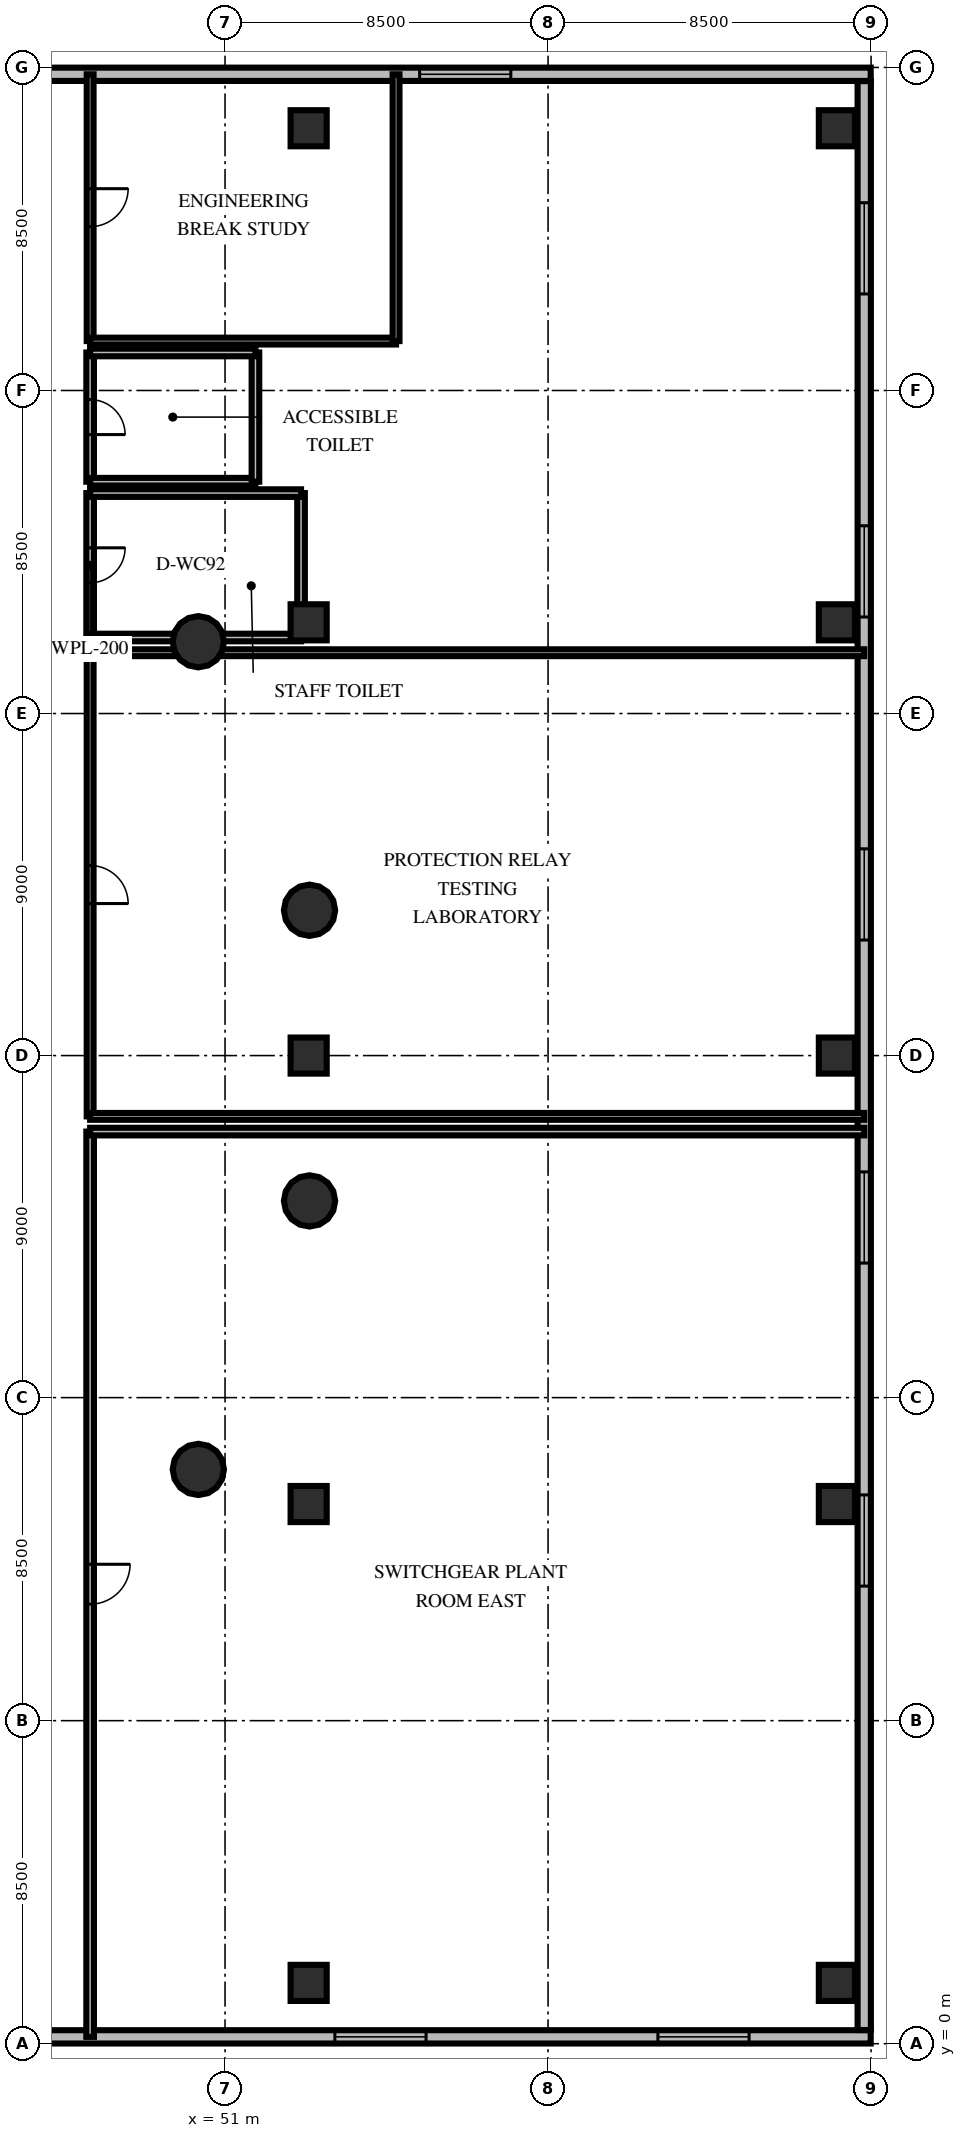
"""IFC4 building model, lengths in metres.
Left out: names, types, materials, properties, quantities, classifications, styles, units other than length and angle.
Written with IfcOpenShell. Run it as: python <this file> out.ifc"""

import sys

from ifc_helpers import new_model, si_unit, direction, frame, frame_2d, origin, origin_2d, place, context, subcontext, project, spatial, rectangle, circle, extrude, element, fill, save


model = new_model("IFC4")
c1 = context("Model", 3, precision=1e-05, world=origin(), true_north=direction((0.0, 1.0)))
c2 = subcontext(c1, "Body", "Model", "MODEL_VIEW")
j1 = project(units=[si_unit("LENGTHUNIT", "METRE"), si_unit("PLANEANGLEUNIT", "RADIAN")], contexts=[c1])
p1 = place(None, origin())
s1 = spatial("IfcSite", under=j1, at=p1, CompositionType="ELEMENT")
p2 = place(p1, origin())
s2 = spatial("IfcBuilding", under=s1, at=p2, CompositionType="ELEMENT")
p3 = place(p2, frame((0.0, 0.0, 15.6)))
s3 = spatial("IfcBuildingStorey", under=s2, at=p3, CompositionType="ELEMENT", Elevation=15.6)
for number, where, z_axis, x_axis in (
    (1, (53.2, 1.6, 0.0), (0.0, 0.0, 1.0), (1.0, 0.0, 0.0)),
    (2, (53.2, 14.2, 0.0), (0.0, 0.0, 1.0), (1.0, 0.0, 0.0)),
    (3, (53.2, 26.0, 0.0), (0.0, 0.0, 1.0), (1.0, 0.0, 0.0)),
    (4, (53.2, 37.4, 0.0), (0.0, 0.0, 1.0), (1.0, 0.0, 0.0)),
    (5, (53.2, 50.4, 0.0), (0.0, 0.0, 1.0), (1.0, 0.0, 0.0)),
    (6, (67.1, 1.6, 0.0), (0.0, 0.0, 1.0), (1.0, 0.0, 0.0)),
    (7, (67.1, 14.2, 0.0), (0.0, 0.0, 1.0), (1.0, 0.0, 0.0)),
    (8, (67.1, 26.0, 0.0), (0.0, 0.0, 1.0), (1.0, 0.0, 0.0)),
    (9, (67.1, 37.4, 0.0), (0.0, 0.0, 1.0), (1.0, 0.0, 0.0)),
    (10, (67.1, 50.4, 0.0), (0.0, 0.0, 1.0), (1.0, 0.0, 0.0)),
):
    element("IfcColumn", number, at=place(p3, frame(where, z_axis=z_axis, x_axis=x_axis)), inside=s3, PredefinedType="COLUMN", context=c2, shape_type="SweptSolid", body=[
        extrude(rectangle(XDim=0.95, YDim=0.95, at=origin_2d()), origin(), (0.0, 0.0, 1.0), 4.8),
    ])
for number, where, z_axis, x_axis in (
    (11, (53.223, 29.824, 0.0), (0.0, 0.0, 1.0), (1.0, 0.0, 0.0)),
    (12, (50.297, 36.889, 0.0), (0.0, 0.0, 1.0), (1.0, 0.0, 0.0)),
    (13, (50.297, 15.111, 0.0), (0.0, 0.0, 1.0), (1.0, 0.0, 0.0)),
    (14, (53.223, 22.176, 0.0), (0.0, 0.0, 1.0), (1.0, 0.0, 0.0)),
):
    element("IfcColumn", number, at=place(p3, frame(where, z_axis=z_axis, x_axis=x_axis)), inside=s3, PredefinedType="COLUMN", context=c2, shape_type="SweptSolid", body=[
        extrude(circle(Radius=0.675, at=origin_2d()), origin(), (0.0, 0.0, 1.0), 4.8),
    ])
p4 = place(p3, frame((67.99, 0.18, 0.0), z_axis=(0.0, 0.0, 1.0), x_axis=(-1.0, 0.0, 0.0)))
e15 = element("IfcWall", 15, at=p4, inside=s3, PredefinedType="SOLIDWALL", context=c2, shape_type="SweptSolid", body=[
    extrude(rectangle(XDim=25.42, YDim=0.35, at=frame_2d((12.71, 0.0))), origin(), (0.0, 0.0, 1.0), 3.76),
])
p5 = place(p4, frame((3.2, 0.0, 0.85)))
e16 = element("IfcOpeningElement", 16, at=p5, cuts=e15, PredefinedType="OPENING", context=c2, shape_type="SweptSolid", body=[
    extrude(rectangle(XDim=2.4, YDim=2.4, at=frame_2d((1.2, 1.2))), frame((0.0, 0.185, 0.0), z_axis=(0.0, -1.0, 0.0), x_axis=(1.0, 0.0, 0.0)), (0.0, 0.0, 1.0), 0.37),
])
p6 = place(p4, frame((11.7, 0.0, 0.85)))
e17 = element("IfcOpeningElement", 17, at=p6, cuts=e15, PredefinedType="OPENING", context=c2, shape_type="SweptSolid", body=[
    extrude(rectangle(XDim=2.4, YDim=2.4, at=frame_2d((1.2, 1.2))), frame((0.0, 0.185, 0.0), z_axis=(0.0, -1.0, 0.0), x_axis=(1.0, 0.0, 0.0)), (0.0, 0.0, 1.0), 0.37),
])
p7 = place(p3, frame((67.82, 51.64, 0.0), z_axis=(0.0, 0.0, 1.0), x_axis=(0.0, -1.0, 0.0)))
e18 = element("IfcWall", 18, at=p7, inside=s3, PredefinedType="SOLIDWALL", context=c2, shape_type="SweptSolid", body=[
    extrude(rectangle(XDim=51.28, YDim=0.35, at=frame_2d((25.64, 0.0))), origin(), (0.0, 0.0, 1.0), 3.76),
])
p8 = place(p7, frame((3.2, 0.0, 0.85)))
e19 = element("IfcOpeningElement", 19, at=p8, cuts=e18, PredefinedType="OPENING", context=c2, shape_type="SweptSolid", body=[
    extrude(rectangle(XDim=2.4, YDim=2.4, at=frame_2d((1.2, 1.2))), frame((0.0, 0.185, 0.0), z_axis=(0.0, -1.0, 0.0), x_axis=(1.0, 0.0, 0.0)), (0.0, 0.0, 1.0), 0.37),
])
p9 = place(p7, frame((11.7, 0.0, 0.85)))
e20 = element("IfcOpeningElement", 20, at=p9, cuts=e18, PredefinedType="OPENING", context=c2, shape_type="SweptSolid", body=[
    extrude(rectangle(XDim=2.4, YDim=2.4, at=frame_2d((1.2, 1.2))), frame((0.0, 0.185, 0.0), z_axis=(0.0, -1.0, 0.0), x_axis=(1.0, 0.0, 0.0)), (0.0, 0.0, 1.0), 0.37),
])
p10 = place(p7, frame((20.2, 0.0, 0.85)))
e21 = element("IfcOpeningElement", 21, at=p10, cuts=e18, PredefinedType="OPENING", context=c2, shape_type="SweptSolid", body=[
    extrude(rectangle(XDim=2.4, YDim=2.4, at=frame_2d((1.2, 1.2))), frame((0.0, 0.185, 0.0), z_axis=(0.0, -1.0, 0.0), x_axis=(1.0, 0.0, 0.0)), (0.0, 0.0, 1.0), 0.37),
])
p11 = place(p7, frame((28.7, 0.0, 0.85)))
e22 = element("IfcOpeningElement", 22, at=p11, cuts=e18, PredefinedType="OPENING", context=c2, shape_type="SweptSolid", body=[
    extrude(rectangle(XDim=2.4, YDim=2.4, at=frame_2d((1.2, 1.2))), frame((0.0, 0.185, 0.0), z_axis=(0.0, -1.0, 0.0), x_axis=(1.0, 0.0, 0.0)), (0.0, 0.0, 1.0), 0.37),
])
p12 = place(p7, frame((37.2, 0.0, 0.85)))
e23 = element("IfcOpeningElement", 23, at=p12, cuts=e18, PredefinedType="OPENING", context=c2, shape_type="SweptSolid", body=[
    extrude(rectangle(XDim=2.4, YDim=2.4, at=frame_2d((1.2, 1.2))), frame((0.0, 0.185, 0.0), z_axis=(0.0, -1.0, 0.0), x_axis=(1.0, 0.0, 0.0)), (0.0, 0.0, 1.0), 0.37),
])
p13 = place(p3, frame((42.57, 51.82, 0.0), z_axis=(0.0, 0.0, 1.0), x_axis=(1.0, 0.0, 0.0)))
e24 = element("IfcWall", 24, at=p13, inside=s3, PredefinedType="SOLIDWALL", context=c2, shape_type="SweptSolid", body=[
    extrude(rectangle(XDim=25.42, YDim=0.35, at=frame_2d((12.71, 0.0))), origin(), (0.0, 0.0, 1.0), 3.76),
])
p14 = place(p13, frame((13.55, 0.0, 0.85)))
e25 = element("IfcOpeningElement", 25, at=p14, cuts=e24, PredefinedType="OPENING", context=c2, shape_type="SweptSolid", body=[
    extrude(rectangle(XDim=2.4, YDim=2.4, at=frame_2d((1.2, 1.2))), frame((0.0, 0.185, 0.0), z_axis=(0.0, -1.0, 0.0), x_axis=(1.0, 0.0, 0.0)), (0.0, 0.0, 1.0), 0.37),
])
p15 = place(p3, frame((47.45, 24.0, 0.0), z_axis=(0.0, 0.0, 1.0), x_axis=(0.0, -1.0, 0.0)))
e26 = element("IfcWall", 26, at=p15, inside=s3, PredefinedType="SOLIDWALL", context=c2, shape_type="SweptSolid", body=[
    extrude(rectangle(XDim=23.82, YDim=0.2, at=frame_2d((11.91, 0.0))), origin(), (0.0, 0.0, 1.0), 2.61),
])
p16 = place(p15, frame((11.385, 0.0, 0.0)))
e27 = element("IfcOpeningElement", 27, at=p16, cuts=e26, PredefinedType="OPENING", context=c2, shape_type="SweptSolid", body=[
    extrude(rectangle(XDim=1.05, YDim=2.15, at=frame_2d((0.525, 1.075))), frame((0.0, 0.11, 0.0), z_axis=(0.0, -1.0, 0.0), x_axis=(1.0, 0.0, 0.0)), (0.0, 0.0, 1.0), 0.22),
])
p17 = place(p3, frame((67.82, 24.0, 0.0), z_axis=(0.0, 0.0, 1.0), x_axis=(-1.0, 0.0, 0.0)))
e28 = element("IfcWall", 28, at=p17, inside=s3, PredefinedType="SOLIDWALL", context=c2, shape_type="SweptSolid", body=[
    extrude(rectangle(XDim=20.37, YDim=0.2, at=frame_2d((10.185, 0.0))), origin(), (0.0, 0.0, 1.0), 2.61),
])
p18 = place(p3, frame((47.45, 36.6, 0.0), z_axis=(0.0, 0.0, 1.0), x_axis=(0.0, -1.0, 0.0)))
e29 = element("IfcWall", 29, at=p18, inside=s3, PredefinedType="PARTITIONING", context=c2, shape_type="SweptSolid", body=[
    extrude(rectangle(XDim=12.2, YDim=0.18, at=frame_2d((6.1, 0.0))), origin(), (0.0, 0.0, 1.0), 2.61),
])
p19 = place(p18, frame((5.6, 0.0, 0.0)))
e30 = element("IfcOpeningElement", 30, at=p19, cuts=e29, PredefinedType="OPENING", context=c2, shape_type="SweptSolid", body=[
    extrude(rectangle(XDim=1.0, YDim=2.15, at=frame_2d((0.5, 1.075))), frame((0.0, 0.1, 0.0), z_axis=(0.0, -1.0, 0.0), x_axis=(1.0, 0.0, 0.0)), (0.0, 0.0, 1.0), 0.2),
])
for number, where, z_axis, x_axis in (
    (31, (47.45, 24.4, 0.0), (0.0, 0.0, 1.0), (1.0, 0.0, 0.0)),
    (32, (67.82, 36.6, 0.0), (0.0, 0.0, 1.0), (-1.0, 0.0, 0.0)),
):
    element("IfcWall", number, at=place(p3, frame(where, z_axis=z_axis, x_axis=x_axis)), inside=s3, PredefinedType="PARTITIONING", context=c2, shape_type="SweptSolid", body=[
        extrude(rectangle(XDim=20.37, YDim=0.18, at=frame_2d((10.185, 0.0))), origin(), (0.0, 0.0, 1.0), 2.61),
    ])
p20 = place(p3, frame((47.45, 40.8, 0.0), z_axis=(0.0, 0.0, 1.0), x_axis=(0.0, -1.0, 0.0)))
e33 = element("IfcWall", 33, at=p20, inside=s3, PredefinedType="PLUMBINGWALL", context=c2, shape_type="SweptSolid", body=[
    extrude(rectangle(XDim=3.8, YDim=0.2, at=frame_2d((1.9, 0.0))), origin(), (0.0, 0.0, 1.0), 2.61),
])
p21 = place(p20, frame((1.44, 0.0, 0.0)))
e34 = element("IfcOpeningElement", 34, at=p21, cuts=e33, PredefinedType="OPENING", context=c2, shape_type="SweptSolid", body=[
    extrude(rectangle(XDim=0.92, YDim=2.1, at=frame_2d((0.46, 1.05))), frame((0.0, 0.11, 0.0), z_axis=(0.0, -1.0, 0.0), x_axis=(1.0, 0.0, 0.0)), (0.0, 0.0, 1.0), 0.22),
])
p22 = place(p3, frame((47.45, 37.0, 0.0), z_axis=(0.0, 0.0, 1.0), x_axis=(1.0, 0.0, 0.0)))
e35 = element("IfcWall", 35, at=p22, inside=s3, PredefinedType="PLUMBINGWALL", context=c2, shape_type="SweptSolid", body=[
    extrude(rectangle(XDim=5.55, YDim=0.2, at=frame_2d((2.775, 0.0))), origin(), (0.0, 0.0, 1.0), 2.61),
])
p23 = place(p3, frame((53.0, 37.0, 0.0), z_axis=(0.0, 0.0, 1.0), x_axis=(0.0, 1.0, 0.0)))
e36 = element("IfcWall", 36, at=p23, inside=s3, PredefinedType="PLUMBINGWALL", context=c2, shape_type="SweptSolid", body=[
    extrude(rectangle(XDim=3.8, YDim=0.2, at=frame_2d((1.9, 0.0))), origin(), (0.0, 0.0, 1.0), 2.61),
])
p24 = place(p3, frame((53.0, 40.8, 0.0), z_axis=(0.0, 0.0, 1.0), x_axis=(-1.0, 0.0, 0.0)))
e37 = element("IfcWall", 37, at=p24, inside=s3, PredefinedType="PLUMBINGWALL", context=c2, shape_type="SweptSolid", body=[
    extrude(rectangle(XDim=5.55, YDim=0.2, at=frame_2d((2.775, 0.0))), origin(), (0.0, 0.0, 1.0), 2.61),
])
p25 = place(p3, frame((47.45, 44.5, 0.0), z_axis=(0.0, 0.0, 1.0), x_axis=(0.0, -1.0, 0.0)))
e38 = element("IfcWall", 38, at=p25, inside=s3, PredefinedType="PLUMBINGWALL", context=c2, shape_type="SweptSolid", body=[
    extrude(rectangle(XDim=3.4, YDim=0.2, at=frame_2d((1.7, 0.0))), origin(), (0.0, 0.0, 1.0), 2.61),
])
p26 = place(p25, frame((1.24, 0.0, 0.0)))
e39 = element("IfcOpeningElement", 39, at=p26, cuts=e38, PredefinedType="OPENING", context=c2, shape_type="SweptSolid", body=[
    extrude(rectangle(XDim=0.92, YDim=2.1, at=frame_2d((0.46, 1.05))), frame((0.0, 0.11, 0.0), z_axis=(0.0, -1.0, 0.0), x_axis=(1.0, 0.0, 0.0)), (0.0, 0.0, 1.0), 0.22),
])
p27 = place(p3, frame((47.45, 41.1, 0.0), z_axis=(0.0, 0.0, 1.0), x_axis=(1.0, 0.0, 0.0)))
e40 = element("IfcWall", 40, at=p27, inside=s3, PredefinedType="PLUMBINGWALL", context=c2, shape_type="SweptSolid", body=[
    extrude(rectangle(XDim=4.35, YDim=0.2, at=frame_2d((2.175, 0.0))), origin(), (0.0, 0.0, 1.0), 2.61),
])
p28 = place(p3, frame((51.8, 41.1, 0.0), z_axis=(0.0, 0.0, 1.0), x_axis=(0.0, 1.0, 0.0)))
e41 = element("IfcWall", 41, at=p28, inside=s3, PredefinedType="PLUMBINGWALL", context=c2, shape_type="SweptSolid", body=[
    extrude(rectangle(XDim=3.4, YDim=0.2, at=frame_2d((1.7, 0.0))), origin(), (0.0, 0.0, 1.0), 2.61),
])
p29 = place(p3, frame((51.8, 44.5, 0.0), z_axis=(0.0, 0.0, 1.0), x_axis=(-1.0, 0.0, 0.0)))
e42 = element("IfcWall", 42, at=p29, inside=s3, PredefinedType="PLUMBINGWALL", context=c2, shape_type="SweptSolid", body=[
    extrude(rectangle(XDim=4.35, YDim=0.2, at=frame_2d((2.175, 0.0))), origin(), (0.0, 0.0, 1.0), 2.61),
])
p30 = place(p3, frame((47.45, 51.82, 0.0), z_axis=(0.0, 0.0, 1.0), x_axis=(0.0, -1.0, 0.0)))
e43 = element("IfcWall", 43, at=p30, inside=s3, PredefinedType="PARTITIONING", context=c2, shape_type="SweptSolid", body=[
    extrude(rectangle(XDim=7.02, YDim=0.18, at=frame_2d((3.51, 0.0))), origin(), (0.0, 0.0, 1.0), 2.61),
])
p31 = place(p30, frame((3.01, 0.0, 0.0)))
e44 = element("IfcOpeningElement", 44, at=p31, cuts=e43, PredefinedType="OPENING", context=c2, shape_type="SweptSolid", body=[
    extrude(rectangle(XDim=1.0, YDim=2.15, at=frame_2d((0.5, 1.075))), frame((0.0, 0.1, 0.0), z_axis=(0.0, -1.0, 0.0), x_axis=(1.0, 0.0, 0.0)), (0.0, 0.0, 1.0), 0.2),
])
p32 = place(p3, frame((47.45, 44.8, 0.0), z_axis=(0.0, 0.0, 1.0), x_axis=(1.0, 0.0, 0.0)))
e45 = element("IfcWall", 45, at=p32, inside=s3, PredefinedType="PARTITIONING", context=c2, shape_type="SweptSolid", body=[
    extrude(rectangle(XDim=8.05, YDim=0.18, at=frame_2d((4.025, 0.0))), origin(), (0.0, 0.0, 1.0), 2.61),
])
p33 = place(p3, frame((55.5, 44.8, 0.0), z_axis=(0.0, 0.0, 1.0), x_axis=(0.0, 1.0, 0.0)))
e46 = element("IfcWall", 46, at=p33, inside=s3, PredefinedType="PARTITIONING", context=c2, shape_type="SweptSolid", body=[
    extrude(rectangle(XDim=7.02, YDim=0.18, at=frame_2d((3.51, 0.0))), origin(), (0.0, 0.0, 1.0), 2.61),
])
p34 = place(p5, origin())
e47 = element("IfcWindow", 47, at=p34, inside=s3, PartitioningType="SINGLE_PANEL", PredefinedType="WINDOW", context=c2, shape_type="SweptSolid", body=[
    extrude(rectangle(XDim=2.4, YDim=2.4, at=frame_2d((1.2, 1.2))), frame((0.0, 0.03, 0.0), z_axis=(0.0, -1.0, 0.0), x_axis=(1.0, 0.0, 0.0)), (0.0, 0.0, 1.0), 0.06),
])
fill(e16, e47)
p35 = place(p6, origin())
e48 = element("IfcWindow", 48, at=p35, inside=s3, PartitioningType="SINGLE_PANEL", PredefinedType="WINDOW", context=c2, shape_type="SweptSolid", body=[
    extrude(rectangle(XDim=2.4, YDim=2.4, at=frame_2d((1.2, 1.2))), frame((0.0, 0.03, 0.0), z_axis=(0.0, -1.0, 0.0), x_axis=(1.0, 0.0, 0.0)), (0.0, 0.0, 1.0), 0.06),
])
fill(e17, e48)
p36 = place(p8, origin())
e49 = element("IfcWindow", 49, at=p36, inside=s3, PartitioningType="SINGLE_PANEL", PredefinedType="WINDOW", context=c2, shape_type="SweptSolid", body=[
    extrude(rectangle(XDim=2.4, YDim=2.4, at=frame_2d((1.2, 1.2))), frame((0.0, 0.03, 0.0), z_axis=(0.0, -1.0, 0.0), x_axis=(1.0, 0.0, 0.0)), (0.0, 0.0, 1.0), 0.06),
])
fill(e19, e49)
p37 = place(p9, origin())
e50 = element("IfcWindow", 50, at=p37, inside=s3, PartitioningType="SINGLE_PANEL", PredefinedType="WINDOW", context=c2, shape_type="SweptSolid", body=[
    extrude(rectangle(XDim=2.4, YDim=2.4, at=frame_2d((1.2, 1.2))), frame((0.0, 0.03, 0.0), z_axis=(0.0, -1.0, 0.0), x_axis=(1.0, 0.0, 0.0)), (0.0, 0.0, 1.0), 0.06),
])
fill(e20, e50)
p38 = place(p10, origin())
e51 = element("IfcWindow", 51, at=p38, inside=s3, PartitioningType="SINGLE_PANEL", PredefinedType="WINDOW", context=c2, shape_type="SweptSolid", body=[
    extrude(rectangle(XDim=2.4, YDim=2.4, at=frame_2d((1.2, 1.2))), frame((0.0, 0.03, 0.0), z_axis=(0.0, -1.0, 0.0), x_axis=(1.0, 0.0, 0.0)), (0.0, 0.0, 1.0), 0.06),
])
fill(e21, e51)
p39 = place(p11, origin())
e52 = element("IfcWindow", 52, at=p39, inside=s3, PartitioningType="SINGLE_PANEL", PredefinedType="WINDOW", context=c2, shape_type="SweptSolid", body=[
    extrude(rectangle(XDim=2.4, YDim=2.4, at=frame_2d((1.2, 1.2))), frame((0.0, 0.03, 0.0), z_axis=(0.0, -1.0, 0.0), x_axis=(1.0, 0.0, 0.0)), (0.0, 0.0, 1.0), 0.06),
])
fill(e22, e52)
p40 = place(p12, origin())
e53 = element("IfcWindow", 53, at=p40, inside=s3, PartitioningType="SINGLE_PANEL", PredefinedType="WINDOW", context=c2, shape_type="SweptSolid", body=[
    extrude(rectangle(XDim=2.4, YDim=2.4, at=frame_2d((1.2, 1.2))), frame((0.0, 0.03, 0.0), z_axis=(0.0, -1.0, 0.0), x_axis=(1.0, 0.0, 0.0)), (0.0, 0.0, 1.0), 0.06),
])
fill(e23, e53)
p41 = place(p14, origin())
e54 = element("IfcWindow", 54, at=p41, inside=s3, PartitioningType="SINGLE_PANEL", PredefinedType="WINDOW", context=c2, shape_type="SweptSolid", body=[
    extrude(rectangle(XDim=2.4, YDim=2.4, at=frame_2d((1.2, 1.2))), frame((0.0, 0.03, 0.0), z_axis=(0.0, -1.0, 0.0), x_axis=(1.0, 0.0, 0.0)), (0.0, 0.0, 1.0), 0.06),
])
fill(e25, e54)
p42 = place(p16, origin())
e55 = element("IfcDoor", 55, at=p42, inside=s3, OperationType="SINGLE_SWING_LEFT", PredefinedType="DOOR", context=c2, shape_type="SweptSolid", body=[
    extrude(rectangle(XDim=1.05, YDim=2.15, at=frame_2d((0.525, 1.075))), frame((0.0, 0.025, 0.0), z_axis=(0.0, -1.0, 0.0), x_axis=(1.0, 0.0, 0.0)), (0.0, 0.0, 1.0), 0.05),
])
fill(e27, e55)
p43 = place(p19, origin())
e56 = element("IfcDoor", 56, at=p43, inside=s3, OperationType="SINGLE_SWING_RIGHT", PredefinedType="DOOR", context=c2, shape_type="SweptSolid", body=[
    extrude(rectangle(XDim=1.0, YDim=2.15, at=frame_2d((0.5, 1.075))), frame((0.0, 0.025, 0.0), z_axis=(0.0, -1.0, 0.0), x_axis=(1.0, 0.0, 0.0)), (0.0, 0.0, 1.0), 0.05),
])
fill(e30, e56)
p44 = place(p21, origin())
e57 = element("IfcDoor", 57, at=p44, inside=s3, OperationType="SINGLE_SWING_LEFT", PredefinedType="DOOR", context=c2, shape_type="SweptSolid", body=[
    extrude(rectangle(XDim=0.92, YDim=2.1, at=frame_2d((0.46, 1.05))), frame((0.0, 0.025, 0.0), z_axis=(0.0, -1.0, 0.0), x_axis=(1.0, 0.0, 0.0)), (0.0, 0.0, 1.0), 0.05),
])
fill(e34, e57)
p45 = place(p26, origin())
e58 = element("IfcDoor", 58, at=p45, inside=s3, OperationType="SINGLE_SWING_RIGHT", PredefinedType="DOOR", context=c2, shape_type="SweptSolid", body=[
    extrude(rectangle(XDim=0.92, YDim=2.1, at=frame_2d((0.46, 1.05))), frame((0.0, 0.025, 0.0), z_axis=(0.0, -1.0, 0.0), x_axis=(1.0, 0.0, 0.0)), (0.0, 0.0, 1.0), 0.05),
])
fill(e39, e58)
p46 = place(p31, origin())
e59 = element("IfcDoor", 59, at=p46, inside=s3, OperationType="SINGLE_SWING_LEFT", PredefinedType="DOOR", context=c2, shape_type="SweptSolid", body=[
    extrude(rectangle(XDim=1.0, YDim=2.15, at=frame_2d((0.5, 1.075))), frame((0.0, 0.025, 0.0), z_axis=(0.0, -1.0, 0.0), x_axis=(1.0, 0.0, 0.0)), (0.0, 0.0, 1.0), 0.05),
])
fill(e44, e59)
save(model, sys.argv[1])
